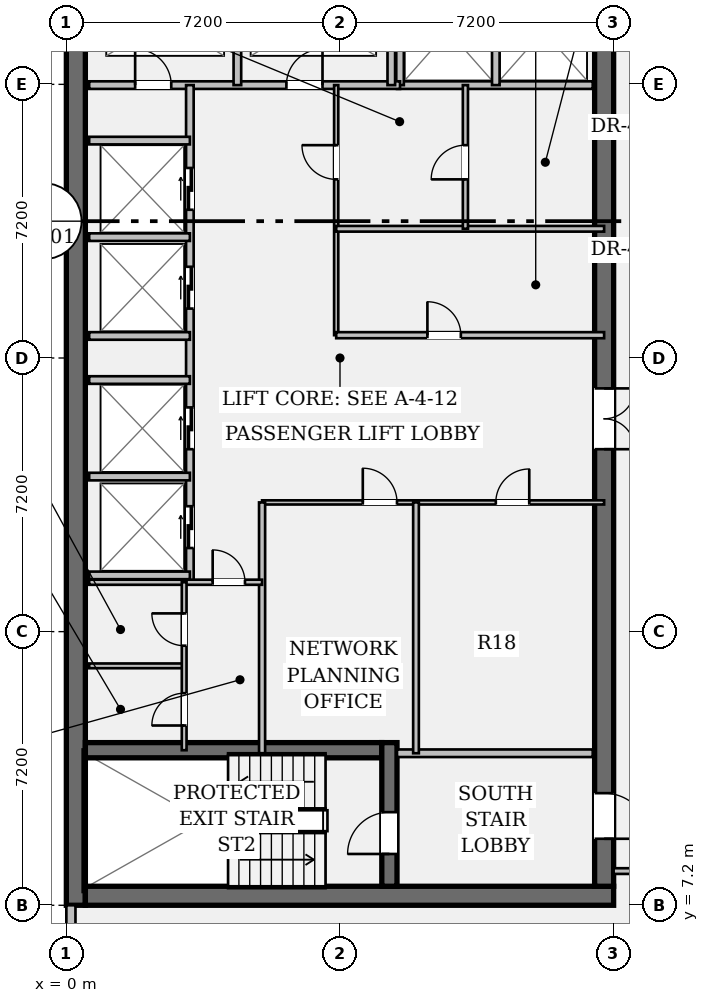
"""IFC4 building model, lengths in metres.
Left out: names, types, materials, properties, quantities, classifications, styles, units other than length and angle.
Written with IfcOpenShell. Run it as: python <this file> out.ifc"""

import sys

from ifc_helpers import new_model, si_unit, direction, frame, frame_2d, origin, place, context, subcontext, project, spatial, rectangle, extrude, element, fill, save


model = new_model("IFC4")
c1 = context("Model", 3, precision=1e-05, world=origin(), true_north=direction((0.0, 1.0)))
c2 = subcontext(c1, "Body", "Model", "MODEL_VIEW")
j1 = project(units=[si_unit("LENGTHUNIT", "METRE"), si_unit("PLANEANGLEUNIT", "RADIAN")], contexts=[c1])
p1 = place(None, origin())
s1 = spatial("IfcSite", under=j1, at=p1, CompositionType="ELEMENT")
p2 = place(p1, origin())
s2 = spatial("IfcBuilding", under=s1, at=p2, CompositionType="ELEMENT")
p3 = place(p2, frame((0.0, 0.0, 211.75)))
s3 = spatial("IfcBuildingStorey", under=s2, at=p3, CompositionType="ELEMENT", Elevation=211.75)
p4 = place(p3, frame((0.25, 7.2, 0.0), z_axis=(0.0, 0.0, 1.0), x_axis=(0.0, 1.0, 0.0)))
e1 = element("IfcWall", 1, at=p4, inside=s3, PredefinedType="SHEAR", context=c2, shape_type="SweptSolid", body=[
    extrude(rectangle(XDim=28.8, YDim=0.5, at=frame_2d((14.4, 0.0))), origin(), (0.0, 0.0, 1.0), 3.24),
])
p5 = place(p3, frame((0.5, 7.45, 0.0), z_axis=(0.0, 0.0, 1.0), x_axis=(1.0, 0.0, 0.0)))
e2 = element("IfcWall", 2, at=p5, inside=s3, PredefinedType="SHEAR", context=c2, shape_type="SweptSolid", body=[
    extrude(rectangle(XDim=13.9, YDim=0.5, at=frame_2d((6.95, 0.0))), origin(), (0.0, 0.0, 1.0), 3.24),
])
p6 = place(p3, frame((14.15, 35.5, 0.0), z_axis=(0.0, 0.0, 1.0), x_axis=(0.0, -1.0, 0.0)))
e3 = element("IfcWall", 3, at=p6, inside=s3, PredefinedType="SHEAR", context=c2, shape_type="SweptSolid", body=[
    extrude(rectangle(XDim=27.8, YDim=0.5, at=frame_2d((13.9, 0.0))), origin(), (0.0, 0.0, 1.0), 3.24),
])
p7 = place(p6, frame((1.4, 0.0, 0.0)))
e4 = element("IfcOpeningElement", 4, at=p7, cuts=e3, PredefinedType="OPENING", context=c2, shape_type="SweptSolid", body=[
    extrude(rectangle(XDim=1.2, YDim=2.15, at=frame_2d((0.6, 1.075))), frame((0.0, 0.262, 0.0), z_axis=(0.0, -1.0, 0.0), x_axis=(1.0, 0.0, 0.0)), (0.0, 0.0, 1.0), 0.524),
])
p8 = place(p6, frame((25.35, 0.0, 0.0)))
e5 = element("IfcOpeningElement", 5, at=p8, cuts=e3, PredefinedType="OPENING", context=c2, shape_type="SweptSolid", body=[
    extrude(rectangle(XDim=1.2, YDim=2.15, at=frame_2d((0.6, 1.075))), frame((0.0, 0.262, 0.0), z_axis=(0.0, -1.0, 0.0), x_axis=(1.0, 0.0, 0.0)), (0.0, 0.0, 1.0), 0.524),
])
p9 = place(p6, frame((14.7, 0.0, 0.0)))
e6 = element("IfcOpeningElement", 6, at=p9, cuts=e3, PredefinedType="OPENING", context=c2, shape_type="SweptSolid", body=[
    extrude(rectangle(XDim=1.6, YDim=2.2, at=frame_2d((0.8, 1.1))), frame((0.0, 0.262, 0.0), z_axis=(0.0, -1.0, 0.0), x_axis=(1.0, 0.0, 0.0)), (0.0, 0.0, 1.0), 0.524),
])
p10 = place(p3, frame((0.5, 11.28, 0.0), z_axis=(0.0, 0.0, 1.0), x_axis=(1.0, 0.0, 0.0)))
e7 = element("IfcWall", 7, at=p10, inside=s3, PredefinedType="SHEAR", context=c2, shape_type="SweptSolid", body=[
    extrude(rectangle(XDim=7.8, YDim=0.4, at=frame_2d((3.9, 0.0))), origin(), (0.0, 0.0, 1.0), 3.24),
])
p11 = place(p3, frame((8.5, 7.7, 0.0), z_axis=(0.0, 0.0, 1.0), x_axis=(0.0, 1.0, 0.0)))
e8 = element("IfcWall", 8, at=p11, inside=s3, PredefinedType="SHEAR", context=c2, shape_type="SweptSolid", body=[
    extrude(rectangle(XDim=3.78, YDim=0.4, at=frame_2d((1.89, 0.0))), origin(), (0.0, 0.0, 1.0), 3.24),
])
p12 = place(p11, frame((0.85, 0.0, 0.0)))
e9 = element("IfcOpeningElement", 9, at=p12, cuts=e8, PredefinedType="OPENING", context=c2, shape_type="SweptSolid", body=[
    extrude(rectangle(XDim=1.1, YDim=2.15, at=frame_2d((0.55, 1.075))), frame((0.0, 0.212, 0.0), z_axis=(0.0, -1.0, 0.0), x_axis=(1.0, 0.0, 0.0)), (0.0, 0.0, 1.0), 0.424),
])
p13 = place(p3, frame((0.12, 5.95, 0.0), z_axis=(0.0, 0.0, 1.0), x_axis=(0.0, 1.0, 0.0)))
e10 = element("IfcWall", 10, at=p13, inside=s3, PredefinedType="STANDARD", context=c2, shape_type="SweptSolid", body=[
    extrude(rectangle(XDim=1.25, YDim=0.24, at=frame_2d((0.625, 0.0))), origin(), (0.0, 0.0, 1.0), 3.24),
])
for number, where, z_axis, x_axis in (
    (11, (8.7, 11.2, 0.0), (0.0, 0.0, 1.0), (1.0, 0.0, 0.0)),
    (12, (8.7, 28.78, 0.0), (0.0, 0.0, 1.0), (1.0, 0.0, 0.0)),
):
    element("IfcWall", number, at=place(p3, frame(where, z_axis=z_axis, x_axis=x_axis)), inside=s3, PredefinedType="PARTITIONING", context=c2, shape_type="SweptSolid", body=[
        extrude(rectangle(XDim=5.15, YDim=0.2, at=frame_2d((2.575, 0.0))), origin(), (0.0, 0.0, 1.0), 3.24),
    ])
for number, where, z_axis, x_axis in (
    (13, (8.78, 28.78, 0.0), (0.0, 0.0, 1.0), (0.0, 1.0, 0.0)),
    (14, (11.3, 28.78, 0.0), (0.0, 0.0, 1.0), (0.0, 1.0, 0.0)),
):
    element("IfcWall", number, at=place(p3, frame(where, z_axis=z_axis, x_axis=x_axis)), inside=s3, PredefinedType="PARTITIONING", context=c2, shape_type="SweptSolid", body=[
        extrude(rectangle(XDim=3.1, YDim=0.2, at=frame_2d((1.55, 0.0))), origin(), (0.0, 0.0, 1.0), 3.24),
    ])
p14 = place(p3, frame((0.6, 28.78, 0.0), z_axis=(0.0, 0.0, 1.0), x_axis=(1.0, 0.0, 0.0)))
e15 = element("IfcWall", 15, at=p14, inside=s3, PredefinedType="PARTITIONING", context=c2, shape_type="SweptSolid", body=[
    extrude(rectangle(XDim=8.18, YDim=0.2, at=frame_2d((4.09, 0.0))), origin(), (0.0, 0.0, 1.0), 3.24),
])
p15 = place(p14, frame((1.21, 0.0, 0.0)))
e16 = element("IfcOpeningElement", 16, at=p15, cuts=e15, PredefinedType="OPENING", context=c2, shape_type="SweptSolid", body=[
    extrude(rectangle(XDim=0.95, YDim=2.15, at=frame_2d((0.475, 1.075))), frame((0.0, 0.112, 0.0), z_axis=(0.0, -1.0, 0.0), x_axis=(1.0, 0.0, 0.0)), (0.0, 0.0, 1.0), 0.224),
])
p16 = place(p14, frame((5.19, 0.0, 0.0)))
e17 = element("IfcOpeningElement", 17, at=p16, cuts=e15, PredefinedType="OPENING", context=c2, shape_type="SweptSolid", body=[
    extrude(rectangle(XDim=0.95, YDim=2.15, at=frame_2d((0.475, 1.075))), frame((0.0, 0.112, 0.0), z_axis=(0.0, -1.0, 0.0), x_axis=(1.0, 0.0, 0.0)), (0.0, 0.0, 1.0), 0.224),
])
for number, where, z_axis, x_axis in (
    (18, (4.5, 28.78, 0.0), (0.0, 0.0, 1.0), (0.0, 1.0, 0.0)),
    (19, (8.55, 28.78, 0.0), (0.0, 0.0, 1.0), (0.0, 1.0, 0.0)),
):
    element("IfcWall", number, at=place(p3, frame(where, z_axis=z_axis, x_axis=x_axis)), inside=s3, PredefinedType="PARTITIONING", context=c2, shape_type="SweptSolid", body=[
        extrude(rectangle(XDim=2.94, YDim=0.2, at=frame_2d((1.47, 0.0))), origin(), (0.0, 0.0, 1.0), 3.24),
    ])
p17 = place(p3, frame((3.25, 15.7, 0.0), z_axis=(0.0, 0.0, 1.0), x_axis=(0.0, 1.0, 0.0)))
e20 = element("IfcWall", 20, at=p17, inside=s3, PredefinedType="PARTITIONING", context=c2, shape_type="SweptSolid", body=[
    extrude(rectangle(XDim=13.08, YDim=0.2, at=frame_2d((6.54, 0.0))), origin(), (0.0, 0.0, 1.0), 3.24),
])
p18 = place(p17, frame((0.9, 0.0, 0.0)))
e21 = element("IfcOpeningElement", 21, at=p18, cuts=e20, PredefinedType="OPENING", context=c2, shape_type="SweptSolid", body=[
    extrude(rectangle(XDim=1.1, YDim=2.2, at=frame_2d((0.55, 1.1))), frame((0.0, 0.112, 0.0), z_axis=(0.0, -1.0, 0.0), x_axis=(1.0, 0.0, 0.0)), (0.0, 0.0, 1.0), 0.224),
])
p19 = place(p17, frame((3.5, 0.0, 0.0)))
e22 = element("IfcOpeningElement", 22, at=p19, cuts=e20, PredefinedType="OPENING", context=c2, shape_type="SweptSolid", body=[
    extrude(rectangle(XDim=1.1, YDim=2.2, at=frame_2d((0.55, 1.1))), frame((0.0, 0.112, 0.0), z_axis=(0.0, -1.0, 0.0), x_axis=(1.0, 0.0, 0.0)), (0.0, 0.0, 1.0), 0.224),
])
p20 = place(p17, frame((7.2, 0.0, 0.0)))
e23 = element("IfcOpeningElement", 23, at=p20, cuts=e20, PredefinedType="OPENING", context=c2, shape_type="SweptSolid", body=[
    extrude(rectangle(XDim=1.1, YDim=2.2, at=frame_2d((0.55, 1.1))), frame((0.0, 0.112, 0.0), z_axis=(0.0, -1.0, 0.0), x_axis=(1.0, 0.0, 0.0)), (0.0, 0.0, 1.0), 0.224),
])
p21 = place(p17, frame((9.8, 0.0, 0.0)))
e24 = element("IfcOpeningElement", 24, at=p21, cuts=e20, PredefinedType="OPENING", context=c2, shape_type="SweptSolid", body=[
    extrude(rectangle(XDim=1.1, YDim=2.2, at=frame_2d((0.55, 1.1))), frame((0.0, 0.112, 0.0), z_axis=(0.0, -1.0, 0.0), x_axis=(1.0, 0.0, 0.0)), (0.0, 0.0, 1.0), 0.224),
])
for number, where, z_axis, x_axis in (
    (25, (0.6, 15.88, 0.0), (0.0, 0.0, 1.0), (1.0, 0.0, 0.0)),
    (26, (0.6, 18.48, 0.0), (0.0, 0.0, 1.0), (1.0, 0.0, 0.0)),
    (27, (0.6, 22.18, 0.0), (0.0, 0.0, 1.0), (1.0, 0.0, 0.0)),
    (28, (0.6, 24.78, 0.0), (0.0, 0.0, 1.0), (1.0, 0.0, 0.0)),
    (29, (0.6, 21.02, 0.0), (0.0, 0.0, 1.0), (1.0, 0.0, 0.0)),
    (30, (0.6, 27.32, 0.0), (0.0, 0.0, 1.0), (1.0, 0.0, 0.0)),
):
    element("IfcWall", number, at=place(p3, frame(where, z_axis=z_axis, x_axis=x_axis)), inside=s3, PredefinedType="PARTITIONING", context=c2, shape_type="SweptSolid", body=[
        extrude(rectangle(XDim=2.65, YDim=0.2, at=frame_2d((1.325, 0.0))), origin(), (0.0, 0.0, 1.0), 3.24),
    ])
p22 = place(p3, frame((7.1, 22.2, 0.0), z_axis=(0.0, 0.0, 1.0), x_axis=(0.0, 1.0, 0.0)))
e31 = element("IfcWall", 31, at=p22, inside=s3, PredefinedType="PARTITIONING", context=c2, shape_type="SweptSolid", body=[
    extrude(rectangle(XDim=6.58, YDim=0.11, at=frame_2d((3.29, 0.0))), origin(), (0.0, 0.0, 1.0), 3.24),
])
p23 = place(p22, frame((4.1, 0.0, 0.0)))
e32 = element("IfcOpeningElement", 32, at=p23, cuts=e31, PredefinedType="OPENING", context=c2, shape_type="SweptSolid", body=[
    extrude(rectangle(XDim=0.9, YDim=2.15, at=frame_2d((0.45, 1.075))), frame((0.0, 0.067, 0.0), z_axis=(0.0, -1.0, 0.0), x_axis=(1.0, 0.0, 0.0)), (0.0, 0.0, 1.0), 0.134),
])
p24 = place(p3, frame((7.1, 22.2, 0.0), z_axis=(0.0, 0.0, 1.0), x_axis=(1.0, 0.0, 0.0)))
e33 = element("IfcWall", 33, at=p24, inside=s3, PredefinedType="PARTITIONING", context=c2, shape_type="SweptSolid", body=[
    extrude(rectangle(XDim=7.05, YDim=0.16, at=frame_2d((3.525, 0.0))), origin(), (0.0, 0.0, 1.0), 3.24),
])
p25 = place(p24, frame((2.4, 0.0, 0.0)))
e34 = element("IfcOpeningElement", 34, at=p25, cuts=e33, PredefinedType="OPENING", context=c2, shape_type="SweptSolid", body=[
    extrude(rectangle(XDim=0.88, YDim=2.15, at=frame_2d((0.44, 1.075))), frame((0.0, 0.092, 0.0), z_axis=(0.0, -1.0, 0.0), x_axis=(1.0, 0.0, 0.0)), (0.0, 0.0, 1.0), 0.184),
])
p26 = place(p3, frame((7.1, 25.0, 0.0), z_axis=(0.0, 0.0, 1.0), x_axis=(1.0, 0.0, 0.0)))
e35 = element("IfcWall", 35, at=p26, inside=s3, PredefinedType="PARTITIONING", context=c2, shape_type="SweptSolid", body=[
    extrude(rectangle(XDim=7.05, YDim=0.15, at=frame_2d((3.525, 0.0))), origin(), (0.0, 0.0, 1.0), 3.24),
])
p27 = place(p3, frame((10.5, 25.0, 0.0), z_axis=(0.0, 0.0, 1.0), x_axis=(0.0, 1.0, 0.0)))
e36 = element("IfcWall", 36, at=p27, inside=s3, PredefinedType="PARTITIONING", context=c2, shape_type="SweptSolid", body=[
    extrude(rectangle(XDim=3.78, YDim=0.135, at=frame_2d((1.89, 0.0))), origin(), (0.0, 0.0, 1.0), 3.24),
])
p28 = place(p27, frame((1.3, 0.0, 0.0)))
e37 = element("IfcOpeningElement", 37, at=p28, cuts=e36, PredefinedType="OPENING", context=c2, shape_type="SweptSolid", body=[
    extrude(rectangle(XDim=0.9, YDim=2.15, at=frame_2d((0.45, 1.075))), frame((0.0, 0.08, 0.0), z_axis=(0.0, -1.0, 0.0), x_axis=(1.0, 0.0, 0.0)), (0.0, 0.0, 1.0), 0.159),
])
p29 = place(p3, frame((5.15, 17.8, 0.0), z_axis=(0.0, 0.0, 1.0), x_axis=(1.0, 0.0, 0.0)))
e38 = element("IfcWall", 38, at=p29, inside=s3, PredefinedType="PARTITIONING", context=c2, shape_type="SweptSolid", body=[
    extrude(rectangle(XDim=9.0, YDim=0.11, at=frame_2d((4.5, 0.0))), origin(), (0.0, 0.0, 1.0), 3.24),
])
p30 = place(p29, frame((2.65, 0.0, 0.0)))
e39 = element("IfcOpeningElement", 39, at=p30, cuts=e38, PredefinedType="OPENING", context=c2, shape_type="SweptSolid", body=[
    extrude(rectangle(XDim=0.9, YDim=2.15, at=frame_2d((0.45, 1.075))), frame((0.0, 0.067, 0.0), z_axis=(0.0, -1.0, 0.0), x_axis=(1.0, 0.0, 0.0)), (0.0, 0.0, 1.0), 0.134),
])
p31 = place(p29, frame((6.15, 0.0, 0.0)))
e40 = element("IfcOpeningElement", 40, at=p31, cuts=e38, PredefinedType="OPENING", context=c2, shape_type="SweptSolid", body=[
    extrude(rectangle(XDim=0.88, YDim=2.15, at=frame_2d((0.44, 1.075))), frame((0.0, 0.067, 0.0), z_axis=(0.0, -1.0, 0.0), x_axis=(1.0, 0.0, 0.0)), (0.0, 0.0, 1.0), 0.134),
])
p32 = place(p3, frame((5.15, 11.2, 0.0), z_axis=(0.0, 0.0, 1.0), x_axis=(0.0, 1.0, 0.0)))
e41 = element("IfcWall", 41, at=p32, inside=s3, PredefinedType="PARTITIONING", context=c2, shape_type="SweptSolid", body=[
    extrude(rectangle(XDim=6.6, YDim=0.16, at=frame_2d((3.3, 0.0))), origin(), (0.0, 0.0, 1.0), 3.24),
])
p33 = place(p3, frame((9.2, 11.2, 0.0), z_axis=(0.0, 0.0, 1.0), x_axis=(0.0, 1.0, 0.0)))
e42 = element("IfcWall", 42, at=p33, inside=s3, PredefinedType="PARTITIONING", context=c2, shape_type="SweptSolid", body=[
    extrude(rectangle(XDim=6.6, YDim=0.15, at=frame_2d((3.3, 0.0))), origin(), (0.0, 0.0, 1.0), 3.24),
])
p34 = place(p3, frame((0.6, 15.7, 0.0), z_axis=(0.0, 0.0, 1.0), x_axis=(1.0, 0.0, 0.0)))
e43 = element("IfcWall", 43, at=p34, inside=s3, PredefinedType="PARTITIONING", context=c2, shape_type="SweptSolid", body=[
    extrude(rectangle(XDim=4.55, YDim=0.135, at=frame_2d((2.275, 0.0))), origin(), (0.0, 0.0, 1.0), 3.24),
])
p35 = place(p34, frame((3.25, 0.0, 0.0)))
e44 = element("IfcOpeningElement", 44, at=p35, cuts=e43, PredefinedType="OPENING", context=c2, shape_type="SweptSolid", body=[
    extrude(rectangle(XDim=0.85, YDim=2.15, at=frame_2d((0.425, 1.075))), frame((0.0, 0.08, 0.0), z_axis=(0.0, -1.0, 0.0), x_axis=(1.0, 0.0, 0.0)), (0.0, 0.0, 1.0), 0.159),
])
p36 = place(p3, frame((0.6, 13.5, 0.0), z_axis=(0.0, 0.0, 1.0), x_axis=(1.0, 0.0, 0.0)))
e45 = element("IfcWall", 45, at=p36, inside=s3, PredefinedType="PARTITIONING", context=c2, shape_type="SweptSolid", body=[
    extrude(rectangle(XDim=2.5, YDim=0.125, at=frame_2d((1.25, 0.0))), origin(), (0.0, 0.0, 1.0), 3.24),
])
p37 = place(p3, frame((3.1, 11.28, 0.0), z_axis=(0.0, 0.0, 1.0), x_axis=(0.0, 1.0, 0.0)))
e46 = element("IfcWall", 46, at=p37, inside=s3, PredefinedType="PARTITIONING", context=c2, shape_type="SweptSolid", body=[
    extrude(rectangle(XDim=4.42, YDim=0.125, at=frame_2d((2.21, 0.0))), origin(), (0.0, 0.0, 1.0), 3.24),
])
p38 = place(p37, frame((0.65, 0.0, 0.0)))
e47 = element("IfcOpeningElement", 47, at=p38, cuts=e46, PredefinedType="OPENING", context=c2, shape_type="SweptSolid", body=[
    extrude(rectangle(XDim=0.85, YDim=2.15, at=frame_2d((0.425, 1.075))), frame((0.0, 0.074, 0.0), z_axis=(0.0, -1.0, 0.0), x_axis=(1.0, 0.0, 0.0)), (0.0, 0.0, 1.0), 0.149),
])
p39 = place(p37, frame((2.75, 0.0, 0.0)))
e48 = element("IfcOpeningElement", 48, at=p39, cuts=e46, PredefinedType="OPENING", context=c2, shape_type="SweptSolid", body=[
    extrude(rectangle(XDim=0.85, YDim=2.15, at=frame_2d((0.425, 1.075))), frame((0.0, 0.074, 0.0), z_axis=(0.0, -1.0, 0.0), x_axis=(1.0, 0.0, 0.0)), (0.0, 0.0, 1.0), 0.149),
])
p40 = place(p3, frame((14.4, 8.1, 0.0), z_axis=(0.0, 0.0, 1.0), x_axis=(1.0, 0.0, 0.0)))
e49 = element("IfcWall", 49, at=p40, inside=s3, PredefinedType="PARTITIONING", context=c2, shape_type="SweptSolid", body=[
    extrude(rectangle(XDim=2.95, YDim=0.15, at=frame_2d((1.475, 0.0))), origin(), (0.0, 0.0, 1.0), 2.808),
])
p41 = place(p40, frame((0.95, 0.0, 0.0)))
e50 = element("IfcOpeningElement", 50, at=p41, cuts=e49, PredefinedType="OPENING", context=c2, shape_type="SweptSolid", body=[
    extrude(rectangle(XDim=0.88, YDim=2.15, at=frame_2d((0.44, 1.075))), frame((0.0, 0.087, 0.0), z_axis=(0.0, -1.0, 0.0), x_axis=(1.0, 0.0, 0.0)), (0.0, 0.0, 1.0), 0.174),
])
p42 = place(p12, origin())
e51 = element("IfcDoor", 51, at=p42, inside=s3, OperationType="SINGLE_SWING_LEFT", PredefinedType="DOOR", context=c2, shape_type="SweptSolid", body=[
    extrude(rectangle(XDim=1.1, YDim=2.15, at=frame_2d((0.55, 1.075))), frame((0.0, 0.025, 0.0), z_axis=(0.0, -1.0, 0.0), x_axis=(1.0, 0.0, 0.0)), (0.0, 0.0, 1.0), 0.05),
])
fill(e9, e51)
p43 = place(p8, origin())
e52 = element("IfcDoor", 52, at=p43, inside=s3, OperationType="SINGLE_SWING_RIGHT", PredefinedType="DOOR", context=c2, shape_type="SweptSolid", body=[
    extrude(rectangle(XDim=1.2, YDim=2.15, at=frame_2d((0.6, 1.075))), frame((0.0, 0.025, 0.0), z_axis=(0.0, -1.0, 0.0), x_axis=(1.0, 0.0, 0.0)), (0.0, 0.0, 1.0), 0.05),
])
fill(e5, e52)
p44 = place(p15, origin())
e53 = element("IfcDoor", 53, at=p44, inside=s3, OperationType="SINGLE_SWING_LEFT", PredefinedType="DOOR", context=c2, shape_type="SweptSolid", body=[
    extrude(rectangle(XDim=0.95, YDim=2.15, at=frame_2d((0.475, 1.075))), frame((0.0, 0.025, 0.0), z_axis=(0.0, -1.0, 0.0), x_axis=(1.0, 0.0, 0.0)), (0.0, 0.0, 1.0), 0.05),
])
fill(e16, e53)
p45 = place(p16, origin())
e54 = element("IfcDoor", 54, at=p45, inside=s3, OperationType="SINGLE_SWING_RIGHT", PredefinedType="DOOR", context=c2, shape_type="SweptSolid", body=[
    extrude(rectangle(XDim=0.95, YDim=2.15, at=frame_2d((0.475, 1.075))), frame((0.0, 0.025, 0.0), z_axis=(0.0, -1.0, 0.0), x_axis=(1.0, 0.0, 0.0)), (0.0, 0.0, 1.0), 0.05),
])
fill(e17, e54)
p46 = place(p9, origin())
e55 = element("IfcDoor", 55, at=p46, inside=s3, OperationType="DOUBLE_DOOR_SINGLE_SWING", PredefinedType="DOOR", context=c2, shape_type="SweptSolid", body=[
    extrude(rectangle(XDim=1.6, YDim=2.2, at=frame_2d((0.8, 1.1))), frame((0.0, 0.025, 0.0), z_axis=(0.0, -1.0, 0.0), x_axis=(1.0, 0.0, 0.0)), (0.0, 0.0, 1.0), 0.05),
])
fill(e6, e55)
p47 = place(p18, origin())
e56 = element("IfcDoor", 56, at=p47, inside=s3, OperationType="DOUBLE_DOOR_SLIDING", PredefinedType="DOOR", context=c2, shape_type="SweptSolid", body=[
    extrude(rectangle(XDim=1.1, YDim=2.2, at=frame_2d((0.55, 1.1))), frame((0.0, 0.025, 0.0), z_axis=(0.0, -1.0, 0.0), x_axis=(1.0, 0.0, 0.0)), (0.0, 0.0, 1.0), 0.05),
])
fill(e21, e56)
p48 = place(p19, origin())
e57 = element("IfcDoor", 57, at=p48, inside=s3, OperationType="DOUBLE_DOOR_SLIDING", PredefinedType="DOOR", context=c2, shape_type="SweptSolid", body=[
    extrude(rectangle(XDim=1.1, YDim=2.2, at=frame_2d((0.55, 1.1))), frame((0.0, 0.025, 0.0), z_axis=(0.0, -1.0, 0.0), x_axis=(1.0, 0.0, 0.0)), (0.0, 0.0, 1.0), 0.05),
])
fill(e22, e57)
p49 = place(p20, origin())
e58 = element("IfcDoor", 58, at=p49, inside=s3, OperationType="DOUBLE_DOOR_SLIDING", PredefinedType="DOOR", context=c2, shape_type="SweptSolid", body=[
    extrude(rectangle(XDim=1.1, YDim=2.2, at=frame_2d((0.55, 1.1))), frame((0.0, 0.025, 0.0), z_axis=(0.0, -1.0, 0.0), x_axis=(1.0, 0.0, 0.0)), (0.0, 0.0, 1.0), 0.05),
])
fill(e23, e58)
p50 = place(p21, origin())
e59 = element("IfcDoor", 59, at=p50, inside=s3, OperationType="DOUBLE_DOOR_SLIDING", PredefinedType="DOOR", context=c2, shape_type="SweptSolid", body=[
    extrude(rectangle(XDim=1.1, YDim=2.2, at=frame_2d((0.55, 1.1))), frame((0.0, 0.025, 0.0), z_axis=(0.0, -1.0, 0.0), x_axis=(1.0, 0.0, 0.0)), (0.0, 0.0, 1.0), 0.05),
])
fill(e24, e59)
p51 = place(p25, origin())
e60 = element("IfcDoor", 60, at=p51, inside=s3, OperationType="SINGLE_SWING_LEFT", PredefinedType="DOOR", context=c2, shape_type="SweptSolid", body=[
    extrude(rectangle(XDim=0.88, YDim=2.15, at=frame_2d((0.44, 1.075))), frame((0.0, 0.025, 0.0), z_axis=(0.0, -1.0, 0.0), x_axis=(1.0, 0.0, 0.0)), (0.0, 0.0, 1.0), 0.05),
])
fill(e34, e60)
p52 = place(p23, origin())
e61 = element("IfcDoor", 61, at=p52, inside=s3, OperationType="SINGLE_SWING_RIGHT", PredefinedType="DOOR", context=c2, shape_type="SweptSolid", body=[
    extrude(rectangle(XDim=0.9, YDim=2.15, at=frame_2d((0.45, 1.075))), frame((0.0, 0.025, 0.0), z_axis=(0.0, -1.0, 0.0), x_axis=(1.0, 0.0, 0.0)), (0.0, 0.0, 1.0), 0.05),
])
fill(e32, e61)
p53 = place(p28, origin())
e62 = element("IfcDoor", 62, at=p53, inside=s3, OperationType="SINGLE_SWING_LEFT", PredefinedType="DOOR", context=c2, shape_type="SweptSolid", body=[
    extrude(rectangle(XDim=0.9, YDim=2.15, at=frame_2d((0.45, 1.075))), frame((0.0, 0.025, 0.0), z_axis=(0.0, -1.0, 0.0), x_axis=(1.0, 0.0, 0.0)), (0.0, 0.0, 1.0), 0.05),
])
fill(e37, e62)
p54 = place(p30, origin())
e63 = element("IfcDoor", 63, at=p54, inside=s3, OperationType="SINGLE_SWING_LEFT", PredefinedType="DOOR", context=c2, shape_type="SweptSolid", body=[
    extrude(rectangle(XDim=0.9, YDim=2.15, at=frame_2d((0.45, 1.075))), frame((0.0, 0.025, 0.0), z_axis=(0.0, -1.0, 0.0), x_axis=(1.0, 0.0, 0.0)), (0.0, 0.0, 1.0), 0.05),
])
fill(e39, e63)
p55 = place(p31, origin())
e64 = element("IfcDoor", 64, at=p55, inside=s3, OperationType="SINGLE_SWING_RIGHT", PredefinedType="DOOR", context=c2, shape_type="SweptSolid", body=[
    extrude(rectangle(XDim=0.88, YDim=2.15, at=frame_2d((0.44, 1.075))), frame((0.0, 0.025, 0.0), z_axis=(0.0, -1.0, 0.0), x_axis=(1.0, 0.0, 0.0)), (0.0, 0.0, 1.0), 0.05),
])
fill(e40, e64)
p56 = place(p35, origin())
e65 = element("IfcDoor", 65, at=p56, inside=s3, OperationType="SINGLE_SWING_LEFT", PredefinedType="DOOR", context=c2, shape_type="SweptSolid", body=[
    extrude(rectangle(XDim=0.85, YDim=2.15, at=frame_2d((0.425, 1.075))), frame((0.0, 0.025, 0.0), z_axis=(0.0, -1.0, 0.0), x_axis=(1.0, 0.0, 0.0)), (0.0, 0.0, 1.0), 0.05),
])
fill(e44, e65)
p57 = place(p38, origin())
e66 = element("IfcDoor", 66, at=p57, inside=s3, OperationType="SINGLE_SWING_LEFT", PredefinedType="DOOR", context=c2, shape_type="SweptSolid", body=[
    extrude(rectangle(XDim=0.85, YDim=2.15, at=frame_2d((0.425, 1.075))), frame((0.0, 0.025, 0.0), z_axis=(0.0, -1.0, 0.0), x_axis=(1.0, 0.0, 0.0)), (0.0, 0.0, 1.0), 0.05),
])
fill(e47, e66)
p58 = place(p39, origin())
e67 = element("IfcDoor", 67, at=p58, inside=s3, OperationType="SINGLE_SWING_RIGHT", PredefinedType="DOOR", context=c2, shape_type="SweptSolid", body=[
    extrude(rectangle(XDim=0.85, YDim=2.15, at=frame_2d((0.425, 1.075))), frame((0.0, 0.025, 0.0), z_axis=(0.0, -1.0, 0.0), x_axis=(1.0, 0.0, 0.0)), (0.0, 0.0, 1.0), 0.05),
])
fill(e48, e67)
save(model, sys.argv[1])
